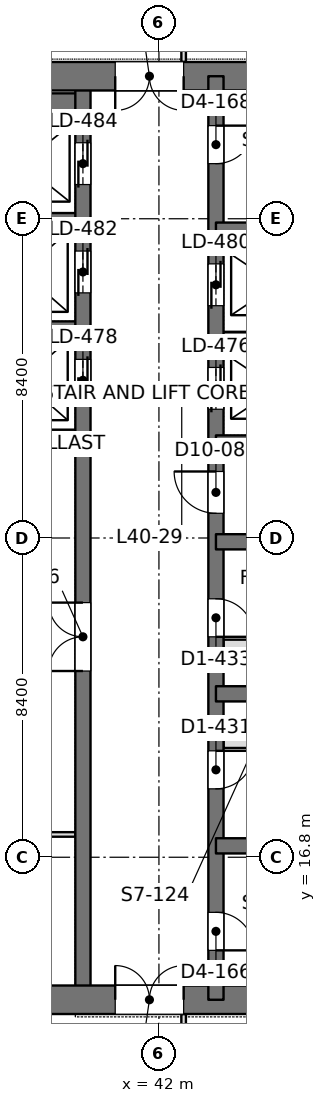
"""IFC4 building model, lengths in metres.
Left out: names, types, materials, properties, quantities, classifications, styles, units other than length and angle.
Written with IfcOpenShell. Run it as: python <this file> out.ifc"""

import sys

from ifc_helpers import new_model, si_unit, direction, frame, frame_2d, origin, place, context, subcontext, project, spatial, rectangle, extrude, element, fill, save


model = new_model("IFC4")
c1 = context("Model", 3, precision=1e-05, world=origin(), true_north=direction((0.0, 1.0)))
c2 = subcontext(c1, "Body", "Model", "MODEL_VIEW")
j1 = project(units=[si_unit("LENGTHUNIT", "METRE"), si_unit("PLANEANGLEUNIT", "RADIAN")], contexts=[c1])
p1 = place(None, origin())
s1 = spatial("IfcSite", under=j1, at=p1, CompositionType="ELEMENT")
p2 = place(p1, origin())
s2 = spatial("IfcBuilding", under=s1, at=p2, CompositionType="ELEMENT")
p3 = place(p2, frame((0.0, 0.0, 177.6)))
s3 = spatial("IfcBuildingStorey", under=s2, at=p3, CompositionType="ELEMENT", Elevation=177.6)
p4 = place(p3, frame((33.675, 13.05, 0.0), z_axis=(0.0, 0.0, 1.0), x_axis=(1.0, 0.0, 0.0)))
e1 = element("IfcWall", 1, at=p4, inside=s3, PredefinedType="SHEAR", context=c2, shape_type="SweptSolid", body=[
    extrude(rectangle(XDim=17.85, YDim=0.75, at=frame_2d((8.925, 0.0))), origin(), (0.0, 0.0, 1.0), 4.2),
])
p5 = place(p4, frame((7.175, 0.0, 0.0)))
e2 = element("IfcOpeningElement", 2, at=p5, cuts=e1, PredefinedType="OPENING", context=c2, shape_type="SweptSolid", body=[
    extrude(rectangle(XDim=1.8, YDim=2.4, at=frame_2d((0.9, 1.2))), frame((0.0, 0.385, 0.0), z_axis=(0.0, -1.0, 0.0), x_axis=(1.0, 0.0, 0.0)), (0.0, 0.0, 1.0), 0.77),
])
p6 = place(p3, frame((33.675, 37.35, 0.0), z_axis=(0.0, 0.0, 1.0), x_axis=(1.0, 0.0, 0.0)))
e3 = element("IfcWall", 3, at=p6, inside=s3, PredefinedType="SHEAR", context=c2, shape_type="SweptSolid", body=[
    extrude(rectangle(XDim=17.85, YDim=0.75, at=frame_2d((8.925, 0.0))), origin(), (0.0, 0.0, 1.0), 4.2),
])
p7 = place(p6, frame((7.175, 0.0, 0.0)))
e4 = element("IfcOpeningElement", 4, at=p7, cuts=e3, PredefinedType="OPENING", context=c2, shape_type="SweptSolid", body=[
    extrude(rectangle(XDim=1.8, YDim=2.4, at=frame_2d((0.9, 1.2))), frame((0.0, 0.385, 0.0), z_axis=(0.0, -1.0, 0.0), x_axis=(1.0, 0.0, 0.0)), (0.0, 0.0, 1.0), 0.77),
])
p8 = place(p3, frame((43.5, 13.05, 0.0), z_axis=(0.0, 0.0, 1.0), x_axis=(0.0, 1.0, 0.0)))
e5 = element("IfcWall", 5, at=p8, inside=s3, PredefinedType="SHEAR", context=c2, shape_type="SweptSolid", body=[
    extrude(rectangle(XDim=24.3, YDim=0.4, at=frame_2d((12.15, 0.0))), origin(), (0.0, 0.0, 1.0), 4.2),
])
p9 = place(p8, frame((1.3, 0.0, 0.0)))
e6 = element("IfcOpeningElement", 6, at=p9, cuts=e5, PredefinedType="OPENING", context=c2, shape_type="SweptSolid", body=[
    extrude(rectangle(XDim=1.0, YDim=2.2, at=frame_2d((0.5, 1.1))), frame((0.0, 0.21, 0.0), z_axis=(0.0, -1.0, 0.0), x_axis=(1.0, 0.0, 0.0)), (0.0, 0.0, 1.0), 0.42),
])
p10 = place(p8, frame((22.0, 0.0, 0.0)))
e7 = element("IfcOpeningElement", 7, at=p10, cuts=e5, PredefinedType="OPENING", context=c2, shape_type="SweptSolid", body=[
    extrude(rectangle(XDim=1.0, YDim=2.2, at=frame_2d((0.5, 1.1))), frame((0.0, 0.21, 0.0), z_axis=(0.0, -1.0, 0.0), x_axis=(1.0, 0.0, 0.0)), (0.0, 0.0, 1.0), 0.42),
])
p11 = place(p8, frame((5.55, 0.0, 0.0)))
e8 = element("IfcOpeningElement", 8, at=p11, cuts=e5, PredefinedType="OPENING", context=c2, shape_type="SweptSolid", body=[
    extrude(rectangle(XDim=1.0, YDim=2.2, at=frame_2d((0.5, 1.1))), frame((0.0, 0.21, 0.0), z_axis=(0.0, -1.0, 0.0), x_axis=(1.0, 0.0, 0.0)), (0.0, 0.0, 1.0), 0.42),
])
p12 = place(p8, frame((9.55, 0.0, 0.0)))
e9 = element("IfcOpeningElement", 9, at=p12, cuts=e5, PredefinedType="OPENING", context=c2, shape_type="SweptSolid", body=[
    extrude(rectangle(XDim=1.0, YDim=2.2, at=frame_2d((0.5, 1.1))), frame((0.0, 0.21, 0.0), z_axis=(0.0, -1.0, 0.0), x_axis=(1.0, 0.0, 0.0)), (0.0, 0.0, 1.0), 0.42),
])
p13 = place(p8, frame((12.8, 0.0, 0.0)))
e10 = element("IfcOpeningElement", 10, at=p13, cuts=e5, PredefinedType="OPENING", context=c2, shape_type="SweptSolid", body=[
    extrude(rectangle(XDim=1.1, YDim=2.2, at=frame_2d((0.55, 1.1))), frame((0.0, 0.21, 0.0), z_axis=(0.0, -1.0, 0.0), x_axis=(1.0, 0.0, 0.0)), (0.0, 0.0, 1.0), 0.42),
])
p14 = place(p8, frame((15.538, 0.0, 0.0)))
e11 = element("IfcOpeningElement", 11, at=p14, cuts=e5, PredefinedType="OPENING", context=c2, shape_type="SweptSolid", body=[
    extrude(rectangle(XDim=1.1, YDim=2.2, at=frame_2d((0.55, 1.1))), frame((0.0, 0.21, 0.0), z_axis=(0.0, -1.0, 0.0), x_axis=(1.0, 0.0, 0.0)), (0.0, 0.0, 1.0), 0.42),
])
p15 = place(p8, frame((18.262, 0.0, 0.0)))
e12 = element("IfcOpeningElement", 12, at=p15, cuts=e5, PredefinedType="OPENING", context=c2, shape_type="SweptSolid", body=[
    extrude(rectangle(XDim=1.1, YDim=2.2, at=frame_2d((0.55, 1.1))), frame((0.0, 0.21, 0.0), z_axis=(0.0, -1.0, 0.0), x_axis=(1.0, 0.0, 0.0)), (0.0, 0.0, 1.0), 0.42),
])
p16 = place(p3, frame((40.0, 13.05, 0.0), z_axis=(0.0, 0.0, 1.0), x_axis=(0.0, 1.0, 0.0)))
e13 = element("IfcWall", 13, at=p16, inside=s3, PredefinedType="SHEAR", context=c2, shape_type="SweptSolid", body=[
    extrude(rectangle(XDim=24.3, YDim=0.4, at=frame_2d((12.15, 0.0))), origin(), (0.0, 0.0, 1.0), 4.2),
])
p17 = place(p16, frame((15.75, 0.0, 0.0)))
e14 = element("IfcOpeningElement", 14, at=p17, cuts=e13, PredefinedType="OPENING", context=c2, shape_type="SweptSolid", body=[
    extrude(rectangle(XDim=1.1, YDim=2.2, at=frame_2d((0.55, 1.1))), frame((0.0, 0.21, 0.0), z_axis=(0.0, -1.0, 0.0), x_axis=(1.0, 0.0, 0.0)), (0.0, 0.0, 1.0), 0.42),
])
p18 = place(p16, frame((18.6, 0.0, 0.0)))
e15 = element("IfcOpeningElement", 15, at=p18, cuts=e13, PredefinedType="OPENING", context=c2, shape_type="SweptSolid", body=[
    extrude(rectangle(XDim=1.1, YDim=2.2, at=frame_2d((0.55, 1.1))), frame((0.0, 0.21, 0.0), z_axis=(0.0, -1.0, 0.0), x_axis=(1.0, 0.0, 0.0)), (0.0, 0.0, 1.0), 0.42),
])
p19 = place(p16, frame((21.45, 0.0, 0.0)))
e16 = element("IfcOpeningElement", 16, at=p19, cuts=e13, PredefinedType="OPENING", context=c2, shape_type="SweptSolid", body=[
    extrude(rectangle(XDim=1.1, YDim=2.2, at=frame_2d((0.55, 1.1))), frame((0.0, 0.21, 0.0), z_axis=(0.0, -1.0, 0.0), x_axis=(1.0, 0.0, 0.0)), (0.0, 0.0, 1.0), 0.42),
])
p20 = place(p16, frame((8.65, 0.0, 0.0)))
e17 = element("IfcOpeningElement", 17, at=p20, cuts=e13, PredefinedType="OPENING", context=c2, shape_type="SweptSolid", body=[
    extrude(rectangle(XDim=1.8, YDim=2.4, at=frame_2d((0.9, 1.2))), frame((0.0, 0.21, 0.0), z_axis=(0.0, -1.0, 0.0), x_axis=(1.0, 0.0, 0.0)), (0.0, 0.0, 1.0), 0.42),
])
for number, where, z_axis, x_axis in (
    (18, (51.15, 17.1, 0.0), (0.0, 0.0, 1.0), (-1.0, 0.0, 0.0)),
    (19, (51.15, 21.1, 0.0), (0.0, 0.0, 1.0), (-1.0, 0.0, 0.0)),
    (20, (51.15, 25.1, 0.0), (0.0, 0.0, 1.0), (-1.0, 0.0, 0.0)),
    (21, (51.15, 27.7, 0.0), (0.0, 0.0, 1.0), (-1.0, 0.0, 0.0)),
    (22, (51.15, 33.3, 0.0), (0.0, 0.0, 1.0), (-1.0, 0.0, 0.0)),
):
    element("IfcWall", number, at=place(p3, frame(where, z_axis=z_axis, x_axis=x_axis)), inside=s3, PredefinedType="SHEAR", context=c2, shape_type="SweptSolid", body=[
        extrude(rectangle(XDim=7.65, YDim=0.4, at=frame_2d((3.825, 0.0))), origin(), (0.0, 0.0, 1.0), 4.2),
    ])
p21 = place(p3, frame((46.7, 30.5, 0.0), z_axis=(0.0, 0.0, 1.0), x_axis=(-1.0, 0.0, 0.0)))
e23 = element("IfcWall", 23, at=p21, inside=s3, PredefinedType="SHEAR", context=c2, shape_type="SweptSolid", body=[
    extrude(rectangle(XDim=3.2, YDim=0.25, at=frame_2d((1.6, 0.0))), origin(), (0.0, 0.0, 1.0), 4.2),
])
p22 = place(p3, frame((40.0, 27.925, 0.0), z_axis=(0.0, 0.0, 1.0), x_axis=(-1.0, 0.0, 0.0)))
e24 = element("IfcWall", 24, at=p22, inside=s3, PredefinedType="SHEAR", context=c2, shape_type="SweptSolid", body=[
    extrude(rectangle(XDim=5.95, YDim=0.25, at=frame_2d((2.975, 0.0))), origin(), (0.0, 0.0, 1.0), 4.2),
])
for number, where, z_axis, x_axis in (
    (25, (40.0, 30.775, 0.0), (0.0, 0.0, 1.0), (-1.0, 0.0, 0.0)),
    (26, (40.0, 33.625, 0.0), (0.0, 0.0, 1.0), (-1.0, 0.0, 0.0)),
):
    element("IfcWall", number, at=place(p3, frame(where, z_axis=z_axis, x_axis=x_axis)), inside=s3, PredefinedType="SHEAR", context=c2, shape_type="SweptSolid", body=[
        extrude(rectangle(XDim=3.2, YDim=0.25, at=frame_2d((1.6, 0.0))), origin(), (0.0, 0.0, 1.0), 4.2),
    ])
p23 = place(p3, frame((40.0, 36.625, 0.0), z_axis=(0.0, 0.0, 1.0), x_axis=(-1.0, 0.0, 0.0)))
e27 = element("IfcWall", 27, at=p23, inside=s3, PredefinedType="SHEAR", context=c2, shape_type="SweptSolid", body=[
    extrude(rectangle(XDim=3.2, YDim=0.55, at=frame_2d((1.6, 0.0))), origin(), (0.0, 0.0, 1.0), 4.2),
])
p24 = place(p3, frame((33.898, 17.4, 0.0), z_axis=(0.0, 0.0, 1.0), x_axis=(1.0, 0.0, 0.0)))
e28 = element("IfcWall", 28, at=p24, inside=s3, PredefinedType="PARTITIONING", context=c2, shape_type="SweptSolid", body=[
    extrude(rectangle(XDim=5.904, YDim=0.12, at=frame_2d((2.952, 0.0))), origin(), (0.0, 0.0, 1.0), 3.55),
])
p25 = place(p3, frame((42.65, 11.158, 0.0), z_axis=(0.0, 0.0, 1.0), x_axis=(0.0, 1.0, 0.0)))
e29 = element("IfcWall", 29, at=p25, inside=s3, PredefinedType="PARTITIONING", context=c2, shape_type="SweptSolid", body=[
    extrude(rectangle(XDim=1.518, YDim=0.12, at=frame_2d((0.759, 0.0))), origin(), (0.0, 0.0, 1.0), 4.05),
])
p26 = place(p25, frame((0.192, 0.0, 0.0)))
e30 = element("IfcOpeningElement", 30, at=p26, cuts=e29, PredefinedType="OPENING", context=c2, shape_type="SweptSolid", body=[
    extrude(rectangle(XDim=1.0, YDim=2.4, at=frame_2d((0.5, 1.2))), frame((0.0, 0.07, 0.0), z_axis=(0.0, -1.0, 0.0), x_axis=(1.0, 0.0, 0.0)), (0.0, 0.0, 1.0), 0.14),
])
p27 = place(p3, frame((42.65, 37.724, 0.0), z_axis=(0.0, 0.0, 1.0), x_axis=(0.0, 1.0, 0.0)))
e31 = element("IfcWall", 31, at=p27, inside=s3, PredefinedType="PARTITIONING", context=c2, shape_type="SweptSolid", body=[
    extrude(rectangle(XDim=1.518, YDim=0.12, at=frame_2d((0.759, 0.0))), origin(), (0.0, 0.0, 1.0), 4.05),
])
p28 = place(p27, frame((0.326, 0.0, 0.0)))
e32 = element("IfcOpeningElement", 32, at=p28, cuts=e31, PredefinedType="OPENING", context=c2, shape_type="SweptSolid", body=[
    extrude(rectangle(XDim=1.0, YDim=2.4, at=frame_2d((0.5, 1.2))), frame((0.0, 0.07, 0.0), z_axis=(0.0, -1.0, 0.0), x_axis=(1.0, 0.0, 0.0)), (0.0, 0.0, 1.0), 0.14),
])
p29 = place(p3, frame((43.7, 22.4, 0.0), z_axis=(0.0, 0.0, 1.0), x_axis=(1.0, 0.0, 0.0)))
e33 = element("IfcWall", 33, at=p29, inside=s3, PredefinedType="PARTITIONING", context=c2, shape_type="SweptSolid", body=[
    extrude(rectangle(XDim=6.675, YDim=0.25, at=frame_2d((3.337, 0.0))), origin(), (0.0, 0.0, 1.0), 4.0),
])
p30 = place(p29, frame((2.863, 0.0, 0.0)))
e34 = element("IfcOpeningElement", 34, at=p30, cuts=e33, PredefinedType="OPENING", context=c2, shape_type="SweptSolid", body=[
    extrude(rectangle(XDim=0.9, YDim=2.2, at=frame_2d((0.45, 1.1))), frame((0.0, 0.135, 0.0), z_axis=(0.0, -1.0, 0.0), x_axis=(1.0, 0.0, 0.0)), (0.0, 0.0, 1.0), 0.27),
])
p31 = place(p3, frame((43.7, 19.8, 0.0), z_axis=(0.0, 0.0, 1.0), x_axis=(1.0, 0.0, 0.0)))
e35 = element("IfcWall", 35, at=p31, inside=s3, PredefinedType="PARTITIONING", context=c2, shape_type="SweptSolid", body=[
    extrude(rectangle(XDim=6.675, YDim=0.25, at=frame_2d((3.337, 0.0))), origin(), (0.0, 0.0, 1.0), 4.0),
])
p32 = place(p31, frame((2.863, 0.0, 0.0)))
e36 = element("IfcOpeningElement", 36, at=p32, cuts=e35, PredefinedType="OPENING", context=c2, shape_type="SweptSolid", body=[
    extrude(rectangle(XDim=0.9, YDim=2.2, at=frame_2d((0.45, 1.1))), frame((0.0, 0.135, 0.0), z_axis=(0.0, -1.0, 0.0), x_axis=(1.0, 0.0, 0.0)), (0.0, 0.0, 1.0), 0.27),
])
p33 = place(p5, origin())
e37 = element("IfcDoor", 37, at=p33, inside=s3, OperationType="DOUBLE_DOOR_SINGLE_SWING", PredefinedType="DOOR", context=c2, shape_type="SweptSolid", body=[
    extrude(rectangle(XDim=1.8, YDim=2.4, at=frame_2d((0.9, 1.2))), frame((0.0, 0.025, 0.0), z_axis=(0.0, -1.0, 0.0), x_axis=(1.0, 0.0, 0.0)), (0.0, 0.0, 1.0), 0.05),
])
fill(e2, e37)
p34 = place(p7, frame((1.8, 0.0, 0.0), z_axis=(0.0, 0.0, 1.0), x_axis=(-1.0, 0.0, 0.0)))
e38 = element("IfcDoor", 38, at=p34, inside=s3, OperationType="DOUBLE_DOOR_SINGLE_SWING", PredefinedType="DOOR", context=c2, shape_type="SweptSolid", body=[
    extrude(rectangle(XDim=1.8, YDim=2.4, at=frame_2d((0.9, 1.2))), frame((0.0, 0.025, 0.0), z_axis=(0.0, -1.0, 0.0), x_axis=(1.0, 0.0, 0.0)), (0.0, 0.0, 1.0), 0.05),
])
fill(e4, e38)
p35 = place(p9, frame((1.0, 0.0, 0.0), z_axis=(0.0, 0.0, 1.0), x_axis=(-1.0, 0.0, 0.0)))
e39 = element("IfcDoor", 39, at=p35, inside=s3, OperationType="SINGLE_SWING_RIGHT", PredefinedType="DOOR", context=c2, shape_type="SweptSolid", body=[
    extrude(rectangle(XDim=1.0, YDim=2.2, at=frame_2d((0.5, 1.1))), frame((0.0, 0.025, 0.0), z_axis=(0.0, -1.0, 0.0), x_axis=(1.0, 0.0, 0.0)), (0.0, 0.0, 1.0), 0.05),
])
fill(e6, e39)
p36 = place(p10, frame((1.0, 0.0, 0.0), z_axis=(0.0, 0.0, 1.0), x_axis=(-1.0, 0.0, 0.0)))
e40 = element("IfcDoor", 40, at=p36, inside=s3, OperationType="SINGLE_SWING_LEFT", PredefinedType="DOOR", context=c2, shape_type="SweptSolid", body=[
    extrude(rectangle(XDim=1.0, YDim=2.2, at=frame_2d((0.5, 1.1))), frame((0.0, 0.025, 0.0), z_axis=(0.0, -1.0, 0.0), x_axis=(1.0, 0.0, 0.0)), (0.0, 0.0, 1.0), 0.05),
])
fill(e7, e40)
p37 = place(p11, frame((1.0, 0.0, 0.0), z_axis=(0.0, 0.0, 1.0), x_axis=(-1.0, 0.0, 0.0)))
e41 = element("IfcDoor", 41, at=p37, inside=s3, OperationType="SINGLE_SWING_LEFT", PredefinedType="DOOR", context=c2, shape_type="SweptSolid", body=[
    extrude(rectangle(XDim=1.0, YDim=2.2, at=frame_2d((0.5, 1.1))), frame((0.0, 0.025, 0.0), z_axis=(0.0, -1.0, 0.0), x_axis=(1.0, 0.0, 0.0)), (0.0, 0.0, 1.0), 0.05),
])
fill(e8, e41)
p38 = place(p12, frame((1.0, 0.0, 0.0), z_axis=(0.0, 0.0, 1.0), x_axis=(-1.0, 0.0, 0.0)))
e42 = element("IfcDoor", 42, at=p38, inside=s3, OperationType="SINGLE_SWING_RIGHT", PredefinedType="DOOR", context=c2, shape_type="SweptSolid", body=[
    extrude(rectangle(XDim=1.0, YDim=2.2, at=frame_2d((0.5, 1.1))), frame((0.0, 0.025, 0.0), z_axis=(0.0, -1.0, 0.0), x_axis=(1.0, 0.0, 0.0)), (0.0, 0.0, 1.0), 0.05),
])
fill(e9, e42)
p39 = place(p13, origin())
e43 = element("IfcDoor", 43, at=p39, inside=s3, OperationType="SINGLE_SWING_RIGHT", PredefinedType="DOOR", context=c2, shape_type="SweptSolid", body=[
    extrude(rectangle(XDim=1.1, YDim=2.2, at=frame_2d((0.55, 1.1))), frame((0.0, 0.025, 0.0), z_axis=(0.0, -1.0, 0.0), x_axis=(1.0, 0.0, 0.0)), (0.0, 0.0, 1.0), 0.05),
])
fill(e10, e43)
p40 = place(p17, origin())
e44 = element("IfcDoor", 44, at=p40, inside=s3, OperationType="DOUBLE_DOOR_SLIDING", PredefinedType="DOOR", context=c2, shape_type="SweptSolid", body=[
    extrude(rectangle(XDim=1.1, YDim=2.2, at=frame_2d((0.55, 1.1))), frame((0.0, 0.025, 0.0), z_axis=(0.0, -1.0, 0.0), x_axis=(1.0, 0.0, 0.0)), (0.0, 0.0, 1.0), 0.05),
])
fill(e14, e44)
p41 = place(p18, origin())
e45 = element("IfcDoor", 45, at=p41, inside=s3, OperationType="DOUBLE_DOOR_SLIDING", PredefinedType="DOOR", context=c2, shape_type="SweptSolid", body=[
    extrude(rectangle(XDim=1.1, YDim=2.2, at=frame_2d((0.55, 1.1))), frame((0.0, 0.025, 0.0), z_axis=(0.0, -1.0, 0.0), x_axis=(1.0, 0.0, 0.0)), (0.0, 0.0, 1.0), 0.05),
])
fill(e15, e45)
p42 = place(p19, origin())
e46 = element("IfcDoor", 46, at=p42, inside=s3, OperationType="DOUBLE_DOOR_SLIDING", PredefinedType="DOOR", context=c2, shape_type="SweptSolid", body=[
    extrude(rectangle(XDim=1.1, YDim=2.2, at=frame_2d((0.55, 1.1))), frame((0.0, 0.025, 0.0), z_axis=(0.0, -1.0, 0.0), x_axis=(1.0, 0.0, 0.0)), (0.0, 0.0, 1.0), 0.05),
])
fill(e16, e46)
p43 = place(p14, origin())
e47 = element("IfcDoor", 47, at=p43, inside=s3, OperationType="DOUBLE_DOOR_SLIDING", PredefinedType="DOOR", context=c2, shape_type="SweptSolid", body=[
    extrude(rectangle(XDim=1.1, YDim=2.2, at=frame_2d((0.55, 1.1))), frame((0.0, 0.025, 0.0), z_axis=(0.0, -1.0, 0.0), x_axis=(1.0, 0.0, 0.0)), (0.0, 0.0, 1.0), 0.05),
])
fill(e11, e47)
p44 = place(p15, origin())
e48 = element("IfcDoor", 48, at=p44, inside=s3, OperationType="DOUBLE_DOOR_SLIDING", PredefinedType="DOOR", context=c2, shape_type="SweptSolid", body=[
    extrude(rectangle(XDim=1.1, YDim=2.2, at=frame_2d((0.55, 1.1))), frame((0.0, 0.025, 0.0), z_axis=(0.0, -1.0, 0.0), x_axis=(1.0, 0.0, 0.0)), (0.0, 0.0, 1.0), 0.05),
])
fill(e12, e48)
p45 = place(p20, origin())
e49 = element("IfcDoor", 49, at=p45, inside=s3, OperationType="DOUBLE_DOOR_SINGLE_SWING", PredefinedType="DOOR", context=c2, shape_type="SweptSolid", body=[
    extrude(rectangle(XDim=1.8, YDim=2.4, at=frame_2d((0.9, 1.2))), frame((0.0, 0.025, 0.0), z_axis=(0.0, -1.0, 0.0), x_axis=(1.0, 0.0, 0.0)), (0.0, 0.0, 1.0), 0.05),
])
fill(e17, e49)
save(model, sys.argv[1])
